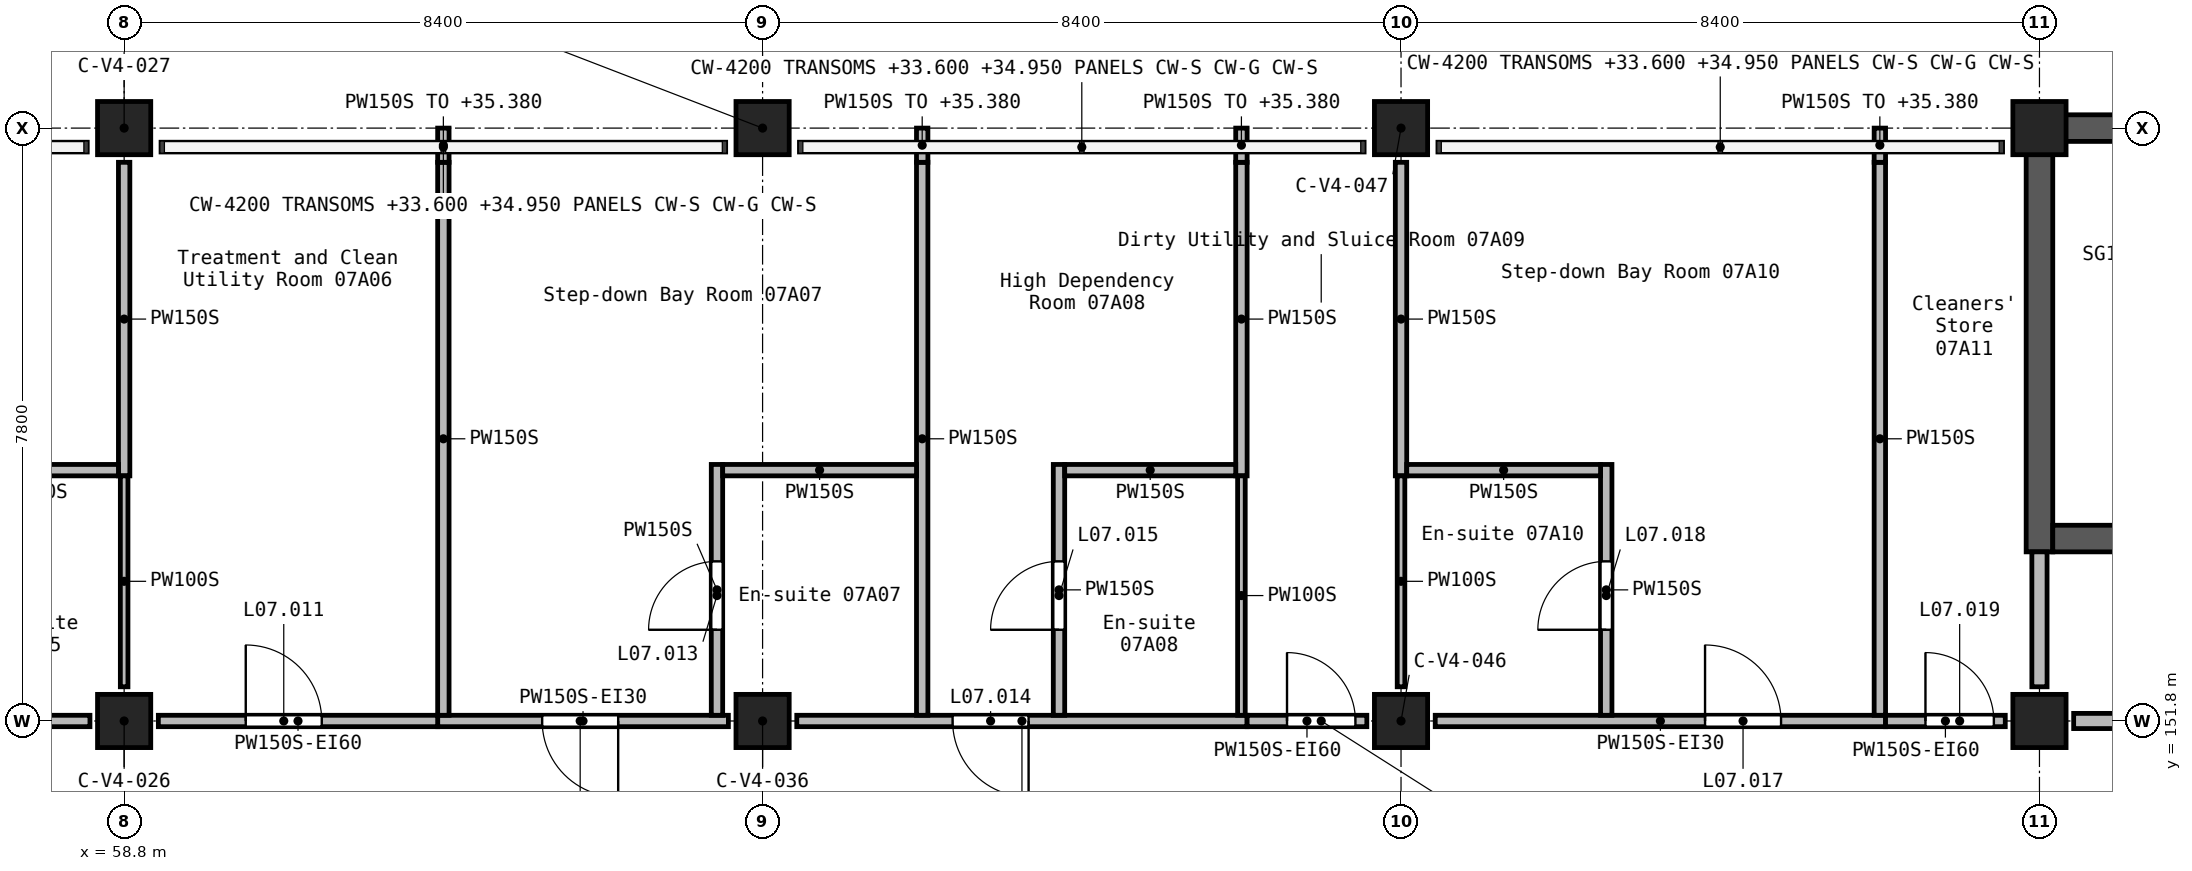
"""IFC4 building model, lengths in metres.
Left out: names, types, materials, properties, quantities, classifications, styles, units other than length and angle.
Written with IfcOpenShell. Run it as: python <this file> out.ifc"""

import sys

from ifc_helpers import new_model, si_unit, direction, frame, frame_2d, origin, origin_2d, place, context, subcontext, project, spatial, rectangle, extrude, element, fill, save


model = new_model("IFC4")
c1 = context("Model", 3, precision=1e-05, world=origin(), true_north=direction((0.0, 1.0)))
c2 = subcontext(c1, "Body", "Model", "MODEL_VIEW")
j1 = project(units=[si_unit("LENGTHUNIT", "METRE"), si_unit("PLANEANGLEUNIT", "RADIAN")], contexts=[c1])
p1 = place(None, origin())
s1 = spatial("IfcSite", under=j1, at=p1, CompositionType="ELEMENT")
p2 = place(p1, origin())
s2 = spatial("IfcBuilding", under=s1, at=p2, CompositionType="ELEMENT")
p3 = place(p2, frame((0.0, 0.0, 32.7)))
s3 = spatial("IfcBuildingStorey", under=s2, at=p3, CompositionType="ELEMENT", Elevation=32.7)
for number, where, z_axis, x_axis in (
    (1, (58.8, 151.8, 0.0), (0.0, 0.0, 1.0), (1.0, 0.0, 0.0)),
    (2, (58.8, 159.6, 0.0), (0.0, 0.0, 1.0), (1.0, 0.0, 0.0)),
    (3, (67.2, 151.8, 0.0), (0.0, 0.0, 1.0), (1.0, 0.0, 0.0)),
    (4, (67.2, 159.6, 0.0), (0.0, 0.0, 1.0), (1.0, 0.0, 0.0)),
    (5, (75.6, 151.8, 0.0), (0.0, 0.0, 1.0), (1.0, 0.0, 0.0)),
    (6, (75.6, 159.6, 0.0), (0.0, 0.0, 1.0), (1.0, 0.0, 0.0)),
    (7, (84.0, 151.8, 0.0), (0.0, 0.0, 1.0), (1.0, 0.0, 0.0)),
    (8, (84.0, 159.6, 0.0), (0.0, 0.0, 1.0), (1.0, 0.0, 0.0)),
):
    element("IfcColumn", number, at=place(p3, frame(where, z_axis=z_axis, x_axis=x_axis)), inside=s3, PredefinedType="COLUMN", context=c2, shape_type="SweptSolid", body=[
        extrude(rectangle(XDim=0.7, YDim=0.7, at=origin_2d()), origin(), (0.0, 0.0, 1.0), 3.9),
    ])
p4 = place(p3, frame((83.825, 159.6, 0.0), z_axis=(0.0, 0.0, 1.0), x_axis=(1.0, 0.0, 0.0)))
e9 = element("IfcWall", 9, at=p4, inside=s3, PredefinedType="SHEAR", context=c2, shape_type="SweptSolid", body=[
    extrude(rectangle(XDim=8.4, YDim=0.35, at=frame_2d((4.2, 0.0))), origin(), (0.0, 0.0, 1.0), 3.9),
])
p5 = place(p3, frame((84.0, 154.025, 0.0), z_axis=(0.0, 0.0, 1.0), x_axis=(0.0, 1.0, 0.0)))
e10 = element("IfcWall", 10, at=p5, inside=s3, PredefinedType="SHEAR", context=c2, shape_type="SweptSolid", body=[
    extrude(rectangle(XDim=5.4, YDim=0.35, at=frame_2d((2.7, 0.0))), origin(), (0.0, 0.0, 1.0), 3.9),
])
p6 = place(p3, frame((84.175, 154.2, 0.0), z_axis=(0.0, 0.0, 1.0), x_axis=(1.0, 0.0, 0.0)))
e11 = element("IfcWall", 11, at=p6, inside=s3, PredefinedType="SHEAR", context=c2, shape_type="SweptSolid", body=[
    extrude(rectangle(XDim=8.05, YDim=0.35, at=frame_2d((4.025, 0.0))), origin(), (0.0, 0.0, 1.0), 3.9),
])
p7 = place(p6, frame((6.525, 0.0, 0.0)))
e12 = element("IfcOpeningElement", 12, at=p7, cuts=e11, PredefinedType="OPENING", context=c2, shape_type="SweptSolid", body=[
    extrude(rectangle(XDim=1.1, YDim=2.1, at=frame_2d((0.55, 1.05))), frame((0.0, 0.185, 0.0), z_axis=(0.0, -1.0, 0.0), x_axis=(1.0, 0.0, 0.0)), (0.0, 0.0, 1.0), 0.37),
])
p8 = place(p3, frame((84.45, 151.8, 0.0), z_axis=(0.0, 0.0, 1.0), x_axis=(1.0, 0.0, 0.0)))
e13 = element("IfcWall", 13, at=p8, inside=s3, PredefinedType="SOLIDWALL", context=c2, shape_type="SweptSolid", body=[
    extrude(rectangle(XDim=7.5, YDim=0.2, at=frame_2d((3.75, 0.0))), origin(), (0.0, 0.0, 1.0), 3.6),
])
p9 = place(p8, frame((3.2, 0.0, 0.0)))
e14 = element("IfcOpeningElement", 14, at=p9, cuts=e13, PredefinedType="OPENING", context=c2, shape_type="SweptSolid", body=[
    extrude(rectangle(XDim=1.1, YDim=2.1, at=frame_2d((0.55, 1.05))), frame((0.0, 0.11, 0.0), z_axis=(0.0, -1.0, 0.0), x_axis=(1.0, 0.0, 0.0)), (0.0, 0.0, 1.0), 0.22),
])
p10 = place(p3, frame((84.0, 152.25, 0.0), z_axis=(0.0, 0.0, 1.0), x_axis=(0.0, 1.0, 0.0)))
e15 = element("IfcWall", 15, at=p10, inside=s3, PredefinedType="SOLIDWALL", context=c2, shape_type="SweptSolid", body=[
    extrude(rectangle(XDim=1.775, YDim=0.2, at=frame_2d((0.887, 0.0))), origin(), (0.0, 0.0, 1.0), 3.6),
])
p11 = place(p3, frame((73.575, 151.8, 0.0), z_axis=(0.0, 0.0, 1.0), x_axis=(-1.0, 0.0, 0.0)))
e16 = element("IfcWall", 16, at=p11, inside=s3, PredefinedType="PARTITIONING", context=c2, shape_type="SweptSolid", body=[
    extrude(rectangle(XDim=5.925, YDim=0.15, at=frame_2d((2.962, 0.0))), origin(), (0.0, 0.0, 1.0), 3.6),
])
p12 = place(p11, frame((2.875, 0.0, 0.0)))
e17 = element("IfcOpeningElement", 17, at=p12, cuts=e16, PredefinedType="OPENING", context=c2, shape_type="SweptSolid", body=[
    extrude(rectangle(XDim=1.0, YDim=2.1, at=frame_2d((0.5, 1.05))), frame((0.0, 0.085, 0.0), z_axis=(0.0, -1.0, 0.0), x_axis=(1.0, 0.0, 0.0)), (0.0, 0.0, 1.0), 0.17),
])
p13 = place(p3, frame((66.75, 151.8, 0.0), z_axis=(0.0, 0.0, 1.0), x_axis=(-1.0, 0.0, 0.0)))
e18 = element("IfcWall", 18, at=p13, inside=s3, PredefinedType="PARTITIONING", context=c2, shape_type="SweptSolid", body=[
    extrude(rectangle(XDim=3.825, YDim=0.15, at=frame_2d((1.913, 0.0))), origin(), (0.0, 0.0, 1.0), 3.6),
])
p14 = place(p13, frame((1.45, 0.0, 0.0)))
e19 = element("IfcOpeningElement", 19, at=p14, cuts=e18, PredefinedType="OPENING", context=c2, shape_type="SweptSolid", body=[
    extrude(rectangle(XDim=1.0, YDim=2.1, at=frame_2d((0.5, 1.05))), frame((0.0, 0.085, 0.0), z_axis=(0.0, -1.0, 0.0), x_axis=(1.0, 0.0, 0.0)), (0.0, 0.0, 1.0), 0.17),
])
p15 = place(p3, frame((76.05, 151.8, 0.0), z_axis=(0.0, 0.0, 1.0), x_axis=(1.0, 0.0, 0.0)))
e20 = element("IfcWall", 20, at=p15, inside=s3, PredefinedType="PARTITIONING", context=c2, shape_type="SweptSolid", body=[
    extrude(rectangle(XDim=5.925, YDim=0.15, at=frame_2d((2.962, 0.0))), origin(), (0.0, 0.0, 1.0), 3.6),
])
p16 = place(p15, frame((3.55, 0.0, 0.0)))
e21 = element("IfcOpeningElement", 21, at=p16, cuts=e20, PredefinedType="OPENING", context=c2, shape_type="SweptSolid", body=[
    extrude(rectangle(XDim=1.0, YDim=2.1, at=frame_2d((0.5, 1.05))), frame((0.0, 0.085, 0.0), z_axis=(0.0, -1.0, 0.0), x_axis=(1.0, 0.0, 0.0)), (0.0, 0.0, 1.0), 0.17),
])
p17 = place(p3, frame((59.25, 151.8, 0.0), z_axis=(0.0, 0.0, 1.0), x_axis=(1.0, 0.0, 0.0)))
e22 = element("IfcWall", 22, at=p17, inside=s3, PredefinedType="PARTITIONING", context=c2, shape_type="SweptSolid", body=[
    extrude(rectangle(XDim=3.675, YDim=0.15, at=frame_2d((1.837, 0.0))), origin(), (0.0, 0.0, 1.0), 3.6),
])
p18 = place(p17, frame((1.15, 0.0, 0.0)))
e23 = element("IfcOpeningElement", 23, at=p18, cuts=e22, PredefinedType="OPENING", context=c2, shape_type="SweptSolid", body=[
    extrude(rectangle(XDim=1.0, YDim=2.1, at=frame_2d((0.5, 1.05))), frame((0.0, 0.085, 0.0), z_axis=(0.0, -1.0, 0.0), x_axis=(1.0, 0.0, 0.0)), (0.0, 0.0, 1.0), 0.17),
])
p19 = place(p3, frame((54.7, 151.8, 0.0), z_axis=(0.0, 0.0, 1.0), x_axis=(1.0, 0.0, 0.0)))
e24 = element("IfcWall", 24, at=p19, inside=s3, PredefinedType="PARTITIONING", context=c2, shape_type="SweptSolid", body=[
    extrude(rectangle(XDim=3.65, YDim=0.15, at=frame_2d((1.825, 0.0))), origin(), (0.0, 0.0, 1.0), 3.6),
])
p20 = place(p19, frame((0.3, 0.0, 0.0)))
e25 = element("IfcOpeningElement", 25, at=p20, cuts=e24, PredefinedType="OPENING", context=c2, shape_type="SweptSolid", body=[
    extrude(rectangle(XDim=1.0, YDim=2.1, at=frame_2d((0.5, 1.05))), frame((0.0, 0.085, 0.0), z_axis=(0.0, -1.0, 0.0), x_axis=(1.0, 0.0, 0.0)), (0.0, 0.0, 1.0), 0.17),
])
p21 = place(p3, frame((73.575, 151.8, 0.0), z_axis=(0.0, 0.0, 1.0), x_axis=(1.0, 0.0, 0.0)))
e26 = element("IfcWall", 26, at=p21, inside=s3, PredefinedType="PARTITIONING", context=c2, shape_type="SweptSolid", body=[
    extrude(rectangle(XDim=1.575, YDim=0.15, at=frame_2d((0.788, 0.0))), origin(), (0.0, 0.0, 1.0), 3.6),
])
p22 = place(p21, frame((0.525, 0.0, 0.0)))
e27 = element("IfcOpeningElement", 27, at=p22, cuts=e26, PredefinedType="OPENING", context=c2, shape_type="SweptSolid", body=[
    extrude(rectangle(XDim=0.9, YDim=2.1, at=frame_2d((0.45, 1.05))), frame((0.0, 0.085, 0.0), z_axis=(0.0, -1.0, 0.0), x_axis=(1.0, 0.0, 0.0)), (0.0, 0.0, 1.0), 0.17),
])
p23 = place(p3, frame((81.975, 151.8, 0.0), z_axis=(0.0, 0.0, 1.0), x_axis=(1.0, 0.0, 0.0)))
e28 = element("IfcWall", 28, at=p23, inside=s3, PredefinedType="PARTITIONING", context=c2, shape_type="SweptSolid", body=[
    extrude(rectangle(XDim=1.575, YDim=0.15, at=frame_2d((0.788, 0.0))), origin(), (0.0, 0.0, 1.0), 3.6),
])
p24 = place(p23, frame((0.525, 0.0, 0.0)))
e29 = element("IfcOpeningElement", 29, at=p24, cuts=e28, PredefinedType="OPENING", context=c2, shape_type="SweptSolid", body=[
    extrude(rectangle(XDim=0.9, YDim=2.1, at=frame_2d((0.45, 1.05))), frame((0.0, 0.085, 0.0), z_axis=(0.0, -1.0, 0.0), x_axis=(1.0, 0.0, 0.0)), (0.0, 0.0, 1.0), 0.17),
])
p25 = place(p3, frame((63.0, 151.875, 0.0), z_axis=(0.0, 0.0, 1.0), x_axis=(0.0, 1.0, 0.0)))
e30 = element("IfcWall", 30, at=p25, inside=s3, PredefinedType="PARTITIONING", context=c2, shape_type="SweptSolid", body=[
    extrude(rectangle(XDim=7.275, YDim=0.15, at=frame_2d((3.637, 0.0))), origin(), (0.0, 0.0, 1.0), 3.6),
])
p26 = place(p3, frame((63.0, 159.15, 0.0), z_axis=(0.0, 0.0, 1.0), x_axis=(0.0, 1.0, 0.0)))
e31 = element("IfcWall", 31, at=p26, inside=s3, PredefinedType="PARTITIONING", context=c2, shape_type="SweptSolid", body=[
    extrude(rectangle(XDim=0.45, YDim=0.15, at=frame_2d((0.225, 0.0))), origin(), (0.0, 0.0, 1.0), 2.68),
])
p27 = place(p3, frame((69.3, 151.875, 0.0), z_axis=(0.0, 0.0, 1.0), x_axis=(0.0, 1.0, 0.0)))
e32 = element("IfcWall", 32, at=p27, inside=s3, PredefinedType="PARTITIONING", context=c2, shape_type="SweptSolid", body=[
    extrude(rectangle(XDim=7.275, YDim=0.15, at=frame_2d((3.637, 0.0))), origin(), (0.0, 0.0, 1.0), 3.6),
])
p28 = place(p3, frame((69.3, 159.15, 0.0), z_axis=(0.0, 0.0, 1.0), x_axis=(0.0, 1.0, 0.0)))
e33 = element("IfcWall", 33, at=p28, inside=s3, PredefinedType="PARTITIONING", context=c2, shape_type="SweptSolid", body=[
    extrude(rectangle(XDim=0.45, YDim=0.15, at=frame_2d((0.225, 0.0))), origin(), (0.0, 0.0, 1.0), 2.68),
])
p29 = place(p3, frame((81.9, 151.875, 0.0), z_axis=(0.0, 0.0, 1.0), x_axis=(0.0, 1.0, 0.0)))
e34 = element("IfcWall", 34, at=p29, inside=s3, PredefinedType="PARTITIONING", context=c2, shape_type="SweptSolid", body=[
    extrude(rectangle(XDim=7.275, YDim=0.15, at=frame_2d((3.637, 0.0))), origin(), (0.0, 0.0, 1.0), 3.6),
])
p30 = place(p3, frame((81.9, 159.15, 0.0), z_axis=(0.0, 0.0, 1.0), x_axis=(0.0, 1.0, 0.0)))
e35 = element("IfcWall", 35, at=p30, inside=s3, PredefinedType="PARTITIONING", context=c2, shape_type="SweptSolid", body=[
    extrude(rectangle(XDim=0.45, YDim=0.15, at=frame_2d((0.225, 0.0))), origin(), (0.0, 0.0, 1.0), 2.68),
])
for number, where, z_axis, x_axis in (
    (36, (58.8, 155.025, 0.0), (0.0, 0.0, 1.0), (0.0, 1.0, 0.0)),
    (37, (73.5, 155.025, 0.0), (0.0, 0.0, 1.0), (0.0, 1.0, 0.0)),
):
    element("IfcWall", number, at=place(p3, frame(where, z_axis=z_axis, x_axis=x_axis)), inside=s3, PredefinedType="PARTITIONING", context=c2, shape_type="SweptSolid", body=[
        extrude(rectangle(XDim=4.125, YDim=0.15, at=frame_2d((2.062, 0.0))), origin(), (0.0, 0.0, 1.0), 3.6),
    ])
p31 = place(p3, frame((73.5, 159.15, 0.0), z_axis=(0.0, 0.0, 1.0), x_axis=(0.0, 1.0, 0.0)))
e38 = element("IfcWall", 38, at=p31, inside=s3, PredefinedType="PARTITIONING", context=c2, shape_type="SweptSolid", body=[
    extrude(rectangle(XDim=0.45, YDim=0.15, at=frame_2d((0.225, 0.0))), origin(), (0.0, 0.0, 1.0), 2.68),
])
p32 = place(p3, frame((75.6, 155.025, 0.0), z_axis=(0.0, 0.0, 1.0), x_axis=(0.0, 1.0, 0.0)))
e39 = element("IfcWall", 39, at=p32, inside=s3, PredefinedType="PARTITIONING", context=c2, shape_type="SweptSolid", body=[
    extrude(rectangle(XDim=4.125, YDim=0.15, at=frame_2d((2.062, 0.0))), origin(), (0.0, 0.0, 1.0), 3.6),
])
p33 = place(p3, frame((66.6, 151.875, 0.0), z_axis=(0.0, 0.0, 1.0), x_axis=(0.0, 1.0, 0.0)))
e40 = element("IfcWall", 40, at=p33, inside=s3, PredefinedType="PARTITIONING", context=c2, shape_type="SweptSolid", body=[
    extrude(rectangle(XDim=3.3, YDim=0.15, at=frame_2d((1.65, 0.0))), origin(), (0.0, 0.0, 1.0), 3.6),
])
p34 = place(p33, frame((1.125, 0.0, 0.0)))
e41 = element("IfcOpeningElement", 41, at=p34, cuts=e40, PredefinedType="OPENING", context=c2, shape_type="SweptSolid", body=[
    extrude(rectangle(XDim=0.9, YDim=2.1, at=frame_2d((0.45, 1.05))), frame((0.0, 0.085, 0.0), z_axis=(0.0, -1.0, 0.0), x_axis=(1.0, 0.0, 0.0)), (0.0, 0.0, 1.0), 0.17),
])
p35 = place(p3, frame((71.1, 151.875, 0.0), z_axis=(0.0, 0.0, 1.0), x_axis=(0.0, 1.0, 0.0)))
e42 = element("IfcWall", 42, at=p35, inside=s3, PredefinedType="PARTITIONING", context=c2, shape_type="SweptSolid", body=[
    extrude(rectangle(XDim=3.3, YDim=0.15, at=frame_2d((1.65, 0.0))), origin(), (0.0, 0.0, 1.0), 3.6),
])
p36 = place(p35, frame((1.125, 0.0, 0.0)))
e43 = element("IfcOpeningElement", 43, at=p36, cuts=e42, PredefinedType="OPENING", context=c2, shape_type="SweptSolid", body=[
    extrude(rectangle(XDim=0.9, YDim=2.1, at=frame_2d((0.45, 1.05))), frame((0.0, 0.085, 0.0), z_axis=(0.0, -1.0, 0.0), x_axis=(1.0, 0.0, 0.0)), (0.0, 0.0, 1.0), 0.17),
])
p37 = place(p3, frame((78.3, 151.875, 0.0), z_axis=(0.0, 0.0, 1.0), x_axis=(0.0, 1.0, 0.0)))
e44 = element("IfcWall", 44, at=p37, inside=s3, PredefinedType="PARTITIONING", context=c2, shape_type="SweptSolid", body=[
    extrude(rectangle(XDim=3.3, YDim=0.15, at=frame_2d((1.65, 0.0))), origin(), (0.0, 0.0, 1.0), 3.6),
])
p38 = place(p37, frame((1.125, 0.0, 0.0)))
e45 = element("IfcOpeningElement", 45, at=p38, cuts=e44, PredefinedType="OPENING", context=c2, shape_type="SweptSolid", body=[
    extrude(rectangle(XDim=0.9, YDim=2.1, at=frame_2d((0.45, 1.05))), frame((0.0, 0.085, 0.0), z_axis=(0.0, -1.0, 0.0), x_axis=(1.0, 0.0, 0.0)), (0.0, 0.0, 1.0), 0.17),
])
for number, where, z_axis, x_axis in (
    (46, (66.675, 155.1, 0.0), (0.0, 0.0, 1.0), (1.0, 0.0, 0.0)),
    (47, (75.675, 155.1, 0.0), (0.0, 0.0, 1.0), (1.0, 0.0, 0.0)),
):
    element("IfcWall", number, at=place(p3, frame(where, z_axis=z_axis, x_axis=x_axis)), inside=s3, PredefinedType="PARTITIONING", context=c2, shape_type="SweptSolid", body=[
        extrude(rectangle(XDim=2.55, YDim=0.15, at=frame_2d((1.275, 0.0))), origin(), (0.0, 0.0, 1.0), 3.6),
    ])
for number, where, z_axis, x_axis in (
    (48, (71.175, 155.1, 0.0), (0.0, 0.0, 1.0), (1.0, 0.0, 0.0)),
    (49, (56.475, 155.1, 0.0), (0.0, 0.0, 1.0), (1.0, 0.0, 0.0)),
):
    element("IfcWall", number, at=place(p3, frame(where, z_axis=z_axis, x_axis=x_axis)), inside=s3, PredefinedType="PARTITIONING", context=c2, shape_type="SweptSolid", body=[
        extrude(rectangle(XDim=2.25, YDim=0.15, at=frame_2d((1.125, 0.0))), origin(), (0.0, 0.0, 1.0), 3.6),
    ])
p39 = place(p3, frame((58.8, 152.25, 0.0), z_axis=(0.0, 0.0, 1.0), x_axis=(0.0, 1.0, 0.0)))
e50 = element("IfcWall", 50, at=p39, inside=s3, PredefinedType="PARTITIONING", context=c2, shape_type="SweptSolid", body=[
    extrude(rectangle(XDim=2.775, YDim=0.1, at=frame_2d((1.387, 0.0))), origin(), (0.0, 0.0, 1.0), 3.6),
])
p40 = place(p3, frame((73.5, 151.875, 0.0), z_axis=(0.0, 0.0, 1.0), x_axis=(0.0, 1.0, 0.0)))
e51 = element("IfcWall", 51, at=p40, inside=s3, PredefinedType="PARTITIONING", context=c2, shape_type="SweptSolid", body=[
    extrude(rectangle(XDim=3.15, YDim=0.1, at=frame_2d((1.575, 0.0))), origin(), (0.0, 0.0, 1.0), 3.6),
])
p41 = place(p3, frame((75.6, 152.25, 0.0), z_axis=(0.0, 0.0, 1.0), x_axis=(0.0, 1.0, 0.0)))
e52 = element("IfcWall", 52, at=p41, inside=s3, PredefinedType="PARTITIONING", context=c2, shape_type="SweptSolid", body=[
    extrude(rectangle(XDim=2.775, YDim=0.1, at=frame_2d((1.387, 0.0))), origin(), (0.0, 0.0, 1.0), 3.6),
])
p42 = place(p18, origin())
e53 = element("IfcDoor", 53, at=p42, inside=s3, OperationType="SINGLE_SWING_LEFT", PredefinedType="DOOR", context=c2, shape_type="SweptSolid", body=[
    extrude(rectangle(XDim=1.0, YDim=2.1, at=frame_2d((0.5, 1.05))), frame((0.0, 0.025, 0.0), z_axis=(0.0, -1.0, 0.0), x_axis=(1.0, 0.0, 0.0)), (0.0, 0.0, 1.0), 0.05),
])
fill(e23, e53)
p43 = place(p14, frame((1.0, 0.0, 0.0), z_axis=(0.0, 0.0, 1.0), x_axis=(-1.0, 0.0, 0.0)))
e54 = element("IfcDoor", 54, at=p43, inside=s3, OperationType="SINGLE_SWING_LEFT", PredefinedType="DOOR", context=c2, shape_type="SweptSolid", body=[
    extrude(rectangle(XDim=1.0, YDim=2.1, at=frame_2d((0.5, 1.05))), frame((0.0, 0.025, 0.0), z_axis=(0.0, -1.0, 0.0), x_axis=(1.0, 0.0, 0.0)), (0.0, 0.0, 1.0), 0.05),
])
fill(e19, e54)
p44 = place(p34, frame((0.9, 0.0, 0.0), z_axis=(0.0, 0.0, 1.0), x_axis=(-1.0, 0.0, 0.0)))
e55 = element("IfcDoor", 55, at=p44, inside=s3, OperationType="SINGLE_SWING_RIGHT", PredefinedType="DOOR", context=c2, shape_type="SweptSolid", body=[
    extrude(rectangle(XDim=0.9, YDim=2.1, at=frame_2d((0.45, 1.05))), frame((0.0, 0.025, 0.0), z_axis=(0.0, -1.0, 0.0), x_axis=(1.0, 0.0, 0.0)), (0.0, 0.0, 1.0), 0.05),
])
fill(e41, e55)
p45 = place(p12, frame((1.0, 0.0, 0.0), z_axis=(0.0, 0.0, 1.0), x_axis=(-1.0, 0.0, 0.0)))
e56 = element("IfcDoor", 56, at=p45, inside=s3, OperationType="SINGLE_SWING_LEFT", PredefinedType="DOOR", context=c2, shape_type="SweptSolid", body=[
    extrude(rectangle(XDim=1.0, YDim=2.1, at=frame_2d((0.5, 1.05))), frame((0.0, 0.025, 0.0), z_axis=(0.0, -1.0, 0.0), x_axis=(1.0, 0.0, 0.0)), (0.0, 0.0, 1.0), 0.05),
])
fill(e17, e56)
p46 = place(p36, frame((0.9, 0.0, 0.0), z_axis=(0.0, 0.0, 1.0), x_axis=(-1.0, 0.0, 0.0)))
e57 = element("IfcDoor", 57, at=p46, inside=s3, OperationType="SINGLE_SWING_RIGHT", PredefinedType="DOOR", context=c2, shape_type="SweptSolid", body=[
    extrude(rectangle(XDim=0.9, YDim=2.1, at=frame_2d((0.45, 1.05))), frame((0.0, 0.025, 0.0), z_axis=(0.0, -1.0, 0.0), x_axis=(1.0, 0.0, 0.0)), (0.0, 0.0, 1.0), 0.05),
])
fill(e43, e57)
p47 = place(p22, origin())
e58 = element("IfcDoor", 58, at=p47, inside=s3, OperationType="SINGLE_SWING_RIGHT", PredefinedType="DOOR", context=c2, shape_type="SweptSolid", body=[
    extrude(rectangle(XDim=0.9, YDim=2.1, at=frame_2d((0.45, 1.05))), frame((0.0, 0.025, 0.0), z_axis=(0.0, -1.0, 0.0), x_axis=(1.0, 0.0, 0.0)), (0.0, 0.0, 1.0), 0.05),
])
fill(e27, e58)
p48 = place(p16, origin())
e59 = element("IfcDoor", 59, at=p48, inside=s3, OperationType="SINGLE_SWING_RIGHT", PredefinedType="DOOR", context=c2, shape_type="SweptSolid", body=[
    extrude(rectangle(XDim=1.0, YDim=2.1, at=frame_2d((0.5, 1.05))), frame((0.0, 0.025, 0.0), z_axis=(0.0, -1.0, 0.0), x_axis=(1.0, 0.0, 0.0)), (0.0, 0.0, 1.0), 0.05),
])
fill(e21, e59)
p49 = place(p38, origin())
e60 = element("IfcDoor", 60, at=p49, inside=s3, OperationType="SINGLE_SWING_LEFT", PredefinedType="DOOR", context=c2, shape_type="SweptSolid", body=[
    extrude(rectangle(XDim=0.9, YDim=2.1, at=frame_2d((0.45, 1.05))), frame((0.0, 0.025, 0.0), z_axis=(0.0, -1.0, 0.0), x_axis=(1.0, 0.0, 0.0)), (0.0, 0.0, 1.0), 0.05),
])
fill(e45, e60)
p50 = place(p24, origin())
e61 = element("IfcDoor", 61, at=p50, inside=s3, OperationType="SINGLE_SWING_RIGHT", PredefinedType="DOOR", context=c2, shape_type="SweptSolid", body=[
    extrude(rectangle(XDim=0.9, YDim=2.1, at=frame_2d((0.45, 1.05))), frame((0.0, 0.025, 0.0), z_axis=(0.0, -1.0, 0.0), x_axis=(1.0, 0.0, 0.0)), (0.0, 0.0, 1.0), 0.05),
])
fill(e29, e61)
save(model, sys.argv[1])
